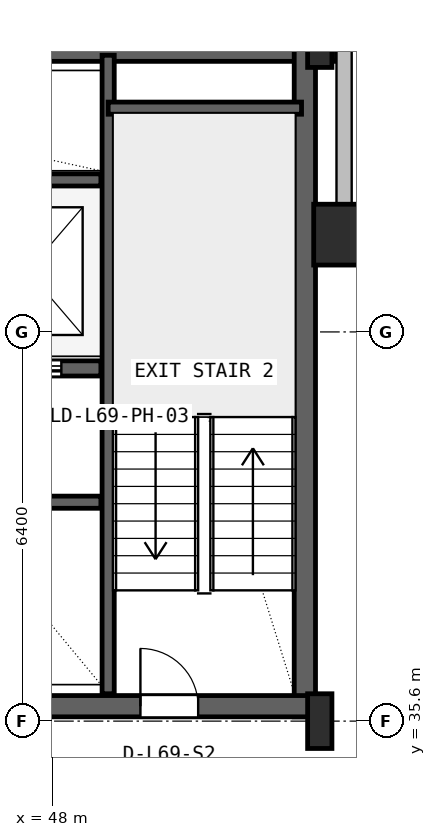
"""IFC4 building model, lengths in metres.
Left out: names, types, materials, properties, quantities, classifications, styles, units other than length and angle.
Written with IfcOpenShell. Run it as: python <this file> out.ifc"""

import sys

from ifc_helpers import new_model, si_unit, direction, frame, frame_2d, origin, origin_2d, place, context, subcontext, project, spatial, rectangle, hollow_rectangle, i_section, extrude, source, transform, mapped, element, fill, save


model = new_model("IFC4")
c1 = context("Model", 3, precision=1e-05, world=origin(), true_north=direction((0.0, 1.0)))
c2 = subcontext(c1, "Body", "Model", "MODEL_VIEW")
j1 = project(units=[si_unit("LENGTHUNIT", "METRE"), si_unit("PLANEANGLEUNIT", "RADIAN")], contexts=[c1])
p1 = place(None, origin())
s1 = spatial("IfcSite", under=j1, at=p1, CompositionType="ELEMENT")
p2 = place(p1, origin())
s2 = spatial("IfcBuilding", under=s1, at=p2, CompositionType="ELEMENT")
p3 = place(p2, frame((0.0, 0.0, 277.4)))
s3 = spatial("IfcBuildingStorey", under=s2, at=p3, CompositionType="ELEMENT", Elevation=277.4)
p4 = place(p3, frame((15.325, 46.625, 0.0), z_axis=(0.0, 0.0, 1.0), x_axis=(1.0, 0.0, 0.0)))
e1 = element("IfcWall", 1, at=p4, inside=s3, PredefinedType="SHEAR", context=c2, shape_type="SweptSolid", body=[
    extrude(rectangle(XDim=37.35, YDim=0.35, at=frame_2d((18.675, 0.0))), origin(), (0.0, 0.0, 1.0), 3.55),
])
p5 = place(p3, frame((52.155, 35.67, 0.0), z_axis=(0.0, 0.0, 1.0), x_axis=(0.0, 1.0, 0.0)))
e2 = element("IfcWall", 2, at=p5, inside=s3, PredefinedType="SHEAR", context=c2, shape_type="SweptSolid", body=[
    extrude(rectangle(XDim=11.13, YDim=0.35, at=frame_2d((5.565, 0.0))), origin(), (0.0, 0.0, 1.0), 3.55),
])
p6 = place(p3, frame((43.2, 35.845, 0.0), z_axis=(0.0, 0.0, 1.0), x_axis=(1.0, 0.0, 0.0)))
e3 = element("IfcWall", 3, at=p6, inside=s3, PredefinedType="SHEAR", context=c2, shape_type="SweptSolid", body=[
    extrude(rectangle(XDim=9.13, YDim=0.35, at=frame_2d((4.565, 0.0))), origin(), (0.0, 0.0, 1.0), 3.55),
])
p7 = place(p6, frame((6.25, 0.0, 0.0)))
e4 = element("IfcOpeningElement", 4, at=p7, cuts=e3, PredefinedType="OPENING", context=c2, shape_type="SweptSolid", body=[
    extrude(rectangle(XDim=0.95, YDim=2.1, at=frame_2d((0.475, 1.05))), frame((0.0, 0.185, 0.0), z_axis=(0.0, -1.0, 0.0), x_axis=(1.0, 0.0, 0.0)), (0.0, 0.0, 1.0), 0.37),
])
m1 = source(origin(), c2, "Body", "SweptSolid", [
    extrude(i_section(OverallWidth=0.4, OverallDepth=0.9, WebThickness=0.016, FlangeThickness=0.028, FilletRadius=0.016, at=origin_2d()), origin(), (0.0, 0.0, 1.0), 3.8),
])
for number, where, z_axis, x_axis in (
    (5, (52.4, 35.6, 0.0), (0.0, 0.0, 1.0), (1.0, 0.0, 0.0)),
    (6, (52.4, 46.8, 0.0), (0.0, 0.0, 1.0), (1.0, 0.0, 0.0)),
):
    element("IfcColumn", number, at=place(p3, frame(where, z_axis=z_axis, x_axis=x_axis)), inside=s3, PredefinedType="COLUMN", context=c2, shape_type="MappedRepresentation", body=[
        mapped(m1, transform((0.0, 0.0, 0.0), x_axis=(1.0, 0.0, 0.0), y_axis=(0.0, 1.0, 0.0), z_axis=(0.0, 0.0, 1.0), scale=1.0)),
    ])
m2 = source(origin(), c2, "Body", "SweptSolid", [
    extrude(hollow_rectangle(XDim=1.0, YDim=1.0, WallThickness=0.04, at=origin_2d()), origin(), (0.0, 0.0, 1.0), 3.8),
])
p8 = place(p3, frame((52.8, 43.6, 0.0), z_axis=(0.0, 0.0, 1.0), x_axis=(1.0, 0.0, 0.0)))
e7 = element("IfcColumn", 7, at=p8, inside=s3, PredefinedType="COLUMN", context=c2, shape_type="MappedRepresentation", body=[
    mapped(m2, transform((0.0, 0.0, 0.0), x_axis=(1.0, 0.0, 0.0), y_axis=(0.0, 1.0, 0.0), z_axis=(0.0, 0.0, 1.0), scale=1.0)),
])
p9 = place(p3, frame((52.93, 43.6, 0.0), z_axis=(0.0, 0.0, 1.0), x_axis=(1.0, 0.0, 0.0)))
e8 = element("IfcWall", 8, at=p9, inside=s3, PredefinedType="SOLIDWALL", context=c2, shape_type="SweptSolid", body=[
    extrude(rectangle(XDim=2.99, YDim=0.25, at=frame_2d((1.495, 0.0))), origin(), (0.0, 0.0, 1.0), 3.53),
])
p10 = place(p3, frame((52.8, 43.52, 0.0), z_axis=(0.0, 0.0, 1.0), x_axis=(0.0, 1.0, 0.0)))
e9 = element("IfcWall", 9, at=p10, inside=s3, PredefinedType="SOLIDWALL", context=c2, shape_type="SweptSolid", body=[
    extrude(rectangle(XDim=3.2, YDim=0.25, at=frame_2d((1.6, 0.0))), origin(), (0.0, 0.0, 1.0), 3.171),
])
p11 = place(p3, frame((48.92, 36.05, 0.0), z_axis=(0.0, 0.0, 1.0), x_axis=(0.0, 1.0, 0.0)))
e10 = element("IfcWall", 10, at=p11, inside=s3, PredefinedType="SHEAR", context=c2, shape_type="SweptSolid", body=[
    extrude(rectangle(XDim=10.5, YDim=0.2, at=frame_2d((5.25, 0.0))), origin(), (0.0, 0.0, 1.0), 3.55),
])
p12 = place(p3, frame((48.92, 45.68, 0.0), z_axis=(0.0, 0.0, 1.0), x_axis=(1.0, 0.0, 0.0)))
e11 = element("IfcWall", 11, at=p12, inside=s3, PredefinedType="SHEAR", context=c2, shape_type="SweptSolid", body=[
    extrude(rectangle(XDim=3.18, YDim=0.2, at=frame_2d((1.59, 0.0))), origin(), (0.0, 0.0, 1.0), 3.55),
])
p13 = place(p3, frame((24.98, 41.4, 0.0), z_axis=(0.0, 0.0, 1.0), x_axis=(1.0, 0.0, 0.0)))
e12 = element("IfcWall", 12, at=p13, inside=s3, PredefinedType="SHEAR", context=c2, shape_type="SweptSolid", body=[
    extrude(rectangle(XDim=23.82, YDim=0.25, at=frame_2d((11.91, 0.0))), origin(), (0.0, 0.0, 1.0), 3.55),
])
p14 = place(p13, frame((16.87, 0.0, 0.0)))
e13 = element("IfcOpeningElement", 13, at=p14, cuts=e12, PredefinedType="OPENING", context=c2, shape_type="SweptSolid", body=[
    extrude(rectangle(XDim=1.1, YDim=2.18, at=frame_2d((0.55, 1.09))), frame((0.0, 0.135, 0.0), z_axis=(0.0, -1.0, 0.0), x_axis=(1.0, 0.0, 0.0)), (0.0, 0.0, 1.0), 0.27),
])
p15 = place(p13, frame((19.47, 0.0, 0.0)))
e14 = element("IfcOpeningElement", 14, at=p15, cuts=e12, PredefinedType="OPENING", context=c2, shape_type="SweptSolid", body=[
    extrude(rectangle(XDim=1.1, YDim=2.18, at=frame_2d((0.55, 1.09))), frame((0.0, 0.135, 0.0), z_axis=(0.0, -1.0, 0.0), x_axis=(1.0, 0.0, 0.0)), (0.0, 0.0, 1.0), 0.27),
])
p16 = place(p13, frame((22.07, 0.0, 0.0)))
e15 = element("IfcOpeningElement", 15, at=p16, cuts=e12, PredefinedType="OPENING", context=c2, shape_type="SweptSolid", body=[
    extrude(rectangle(XDim=1.1, YDim=2.18, at=frame_2d((0.55, 1.09))), frame((0.0, 0.135, 0.0), z_axis=(0.0, -1.0, 0.0), x_axis=(1.0, 0.0, 0.0)), (0.0, 0.0, 1.0), 0.27),
])
p17 = place(p13, frame((3.56, 0.0, 0.0)))
e16 = element("IfcOpeningElement", 16, at=p17, cuts=e12, PredefinedType="OPENING", context=c2, shape_type="SweptSolid", body=[
    extrude(rectangle(XDim=1.0, YDim=2.08, at=frame_2d((0.5, 1.04))), frame((0.0, 0.135, 0.0), z_axis=(0.0, -1.0, 0.0), x_axis=(1.0, 0.0, 0.0)), (0.0, 0.0, 1.0), 0.27),
])
p18 = place(p13, frame((9.76, 0.0, 0.0)))
e17 = element("IfcOpeningElement", 17, at=p18, cuts=e12, PredefinedType="OPENING", context=c2, shape_type="SweptSolid", body=[
    extrude(rectangle(XDim=0.92, YDim=2.08, at=frame_2d((0.46, 1.04))), frame((0.0, 0.135, 0.0), z_axis=(0.0, -1.0, 0.0), x_axis=(1.0, 0.0, 0.0)), (0.0, 0.0, 1.0), 0.27),
])
p19 = place(p13, frame((13.66, 0.0, 0.0)))
e18 = element("IfcOpeningElement", 18, at=p19, cuts=e12, PredefinedType="OPENING", context=c2, shape_type="SweptSolid", body=[
    extrude(rectangle(XDim=0.92, YDim=2.08, at=frame_2d((0.46, 1.04))), frame((0.0, 0.135, 0.0), z_axis=(0.0, -1.0, 0.0), x_axis=(1.0, 0.0, 0.0)), (0.0, 0.0, 1.0), 0.27),
])
p20 = place(p3, frame((41.22, 44.5, 0.0), z_axis=(0.0, 0.0, 1.0), x_axis=(1.0, 0.0, 0.0)))
e19 = element("IfcWall", 19, at=p20, inside=s3, PredefinedType="SHEAR", context=c2, shape_type="SweptSolid", body=[
    extrude(rectangle(XDim=7.58, YDim=0.2, at=frame_2d((3.79, 0.0))), origin(), (0.0, 0.0, 1.0), 3.55),
])
p21 = place(p3, frame((43.65, 39.2, 0.0), z_axis=(0.0, 0.0, 1.0), x_axis=(1.0, 0.0, 0.0)))
e20 = element("IfcWall", 20, at=p21, inside=s3, PredefinedType="SHEAR", context=c2, shape_type="SweptSolid", body=[
    extrude(rectangle(XDim=5.15, YDim=0.2, at=frame_2d((2.575, 0.0))), origin(), (0.0, 0.0, 1.0), 3.55),
])
m3 = source(origin(), c2, "Body", "SweptSolid", [
    extrude(rectangle(XDim=0.95, YDim=2.1, at=frame_2d((0.475, 1.05))), frame((0.0, 0.025, 0.0), z_axis=(0.0, -1.0, 0.0), x_axis=(1.0, 0.0, 0.0)), (0.0, 0.0, 1.0), 0.05),
])
p22 = place(p7, origin())
e21 = element("IfcDoor", 21, at=p22, inside=s3, OperationType="SINGLE_SWING_LEFT", PredefinedType="DOOR", context=c2, shape_type="MappedRepresentation", body=[
    mapped(m3, transform((0.0, 0.0, 0.0), x_axis=(1.0, 0.0, 0.0), y_axis=(0.0, 1.0, 0.0), z_axis=(0.0, 0.0, 1.0), scale=1.0)),
])
fill(e4, e21)
m4 = source(origin(), c2, "Body", "SweptSolid", [
    extrude(rectangle(XDim=1.1, YDim=2.18, at=frame_2d((0.55, 1.09))), frame((0.0, 0.025, 0.0), z_axis=(0.0, -1.0, 0.0), x_axis=(1.0, 0.0, 0.0)), (0.0, 0.0, 1.0), 0.05),
])
p23 = place(p16, frame((1.1, 0.0, 0.0), z_axis=(0.0, 0.0, 1.0), x_axis=(-1.0, 0.0, 0.0)))
e22 = element("IfcDoor", 22, at=p23, inside=s3, OperationType="SLIDING_TO_LEFT", PredefinedType="DOOR", context=c2, shape_type="MappedRepresentation", body=[
    mapped(m4, transform((0.0, 0.0, 0.0), x_axis=(1.0, 0.0, 0.0), y_axis=(0.0, 1.0, 0.0), z_axis=(0.0, 0.0, 1.0), scale=1.0)),
])
fill(e15, e22)
save(model, sys.argv[1])
